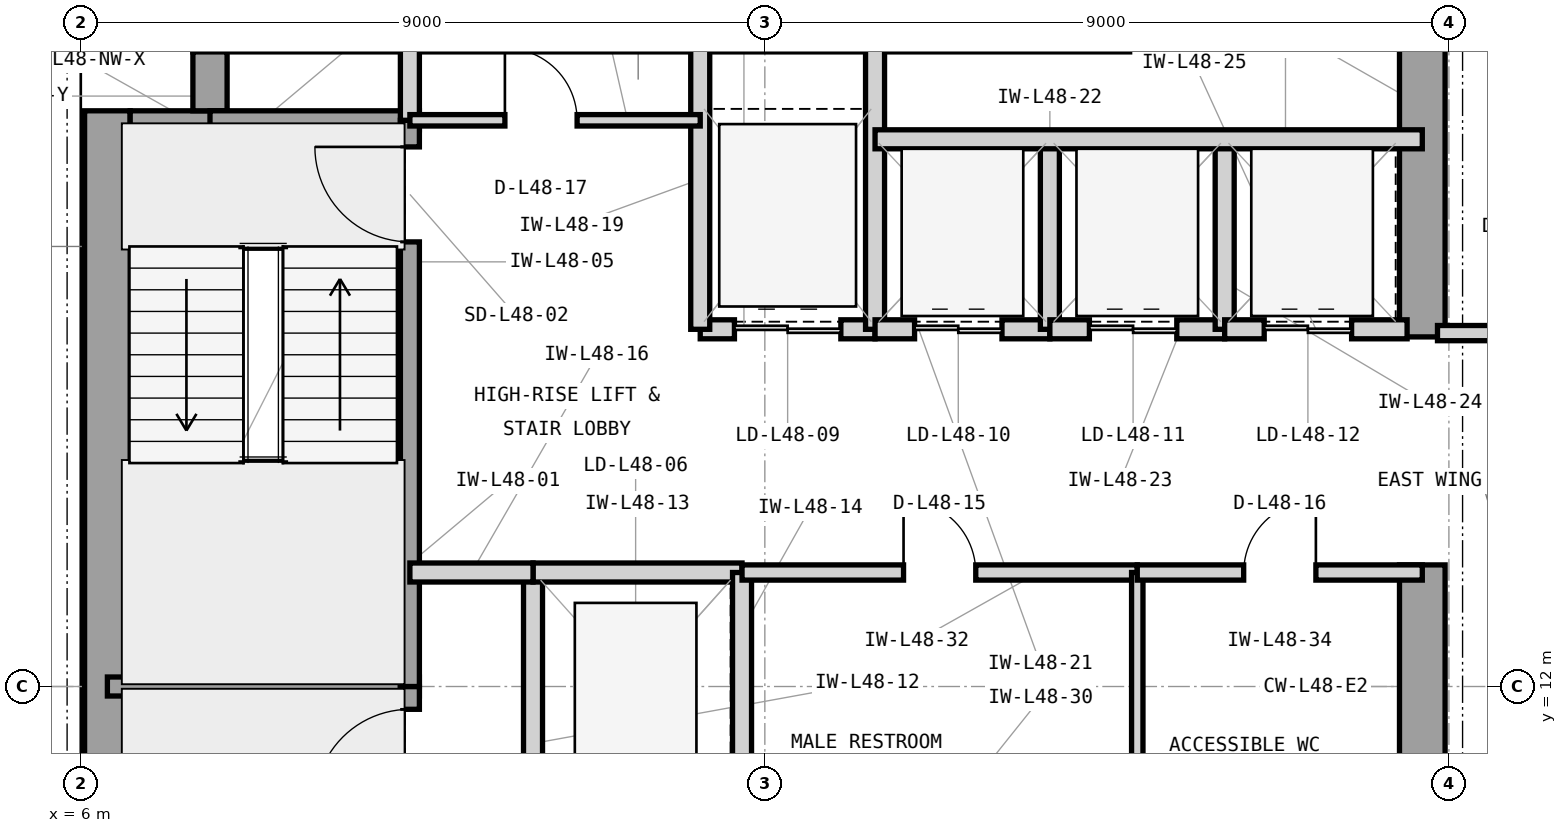
"""IFC4 building model, lengths in metres.
Left out: names, types, materials, properties, quantities, classifications, styles, units other than length and angle.
Written with IfcOpenShell. Run it as: python <this file> out.ifc"""

import sys

from ifc_helpers import new_model, si_unit, direction, frame, frame_2d, origin, place, context, subcontext, project, spatial, rectangle, extrude, element, fill, save


model = new_model("IFC4")
c1 = context("Model", 3, precision=1e-05, world=origin(), true_north=direction((0.0, 1.0)))
c2 = subcontext(c1, "Body", "Model", "MODEL_VIEW")
j1 = project(units=[si_unit("LENGTHUNIT", "METRE"), si_unit("PLANEANGLEUNIT", "RADIAN")], contexts=[c1])
p1 = place(None, origin())
s1 = spatial("IfcSite", under=j1, at=p1, CompositionType="ELEMENT")
p2 = place(p1, origin())
s2 = spatial("IfcBuilding", under=s1, at=p2, CompositionType="ELEMENT")
p3 = place(p2, frame((0.0, 0.0, 199.5)))
s3 = spatial("IfcBuildingStorey", under=s2, at=p3, CompositionType="ELEMENT", Elevation=199.5)
p4 = place(p3, frame((6.35, 4.425, 0.0), z_axis=(0.0, 0.0, 1.0), x_axis=(0.0, 1.0, 0.0)))
e1 = element("IfcWall", 1, at=p4, inside=s3, PredefinedType="SHEAR", context=c2, shape_type="SweptSolid", body=[
    extrude(rectangle(XDim=15.15, YDim=0.6, at=frame_2d((7.575, 0.0))), origin(), (0.0, 0.0, 1.0), 3.9),
])
p5 = place(p3, frame((7.475, 20.65, 0.0), z_axis=(0.0, 0.0, 1.0), x_axis=(1.0, 0.0, 0.0)))
e2 = element("IfcWall", 2, at=p5, inside=s3, PredefinedType="SHEAR", context=c2, shape_type="SweptSolid", body=[
    extrude(rectangle(XDim=12.325, YDim=0.6, at=frame_2d((6.163, 0.0))), origin(), (0.0, 0.0, 1.0), 3.9),
])
p6 = place(p3, frame((23.65, 10.4, 0.0), z_axis=(0.0, 0.0, 1.0), x_axis=(0.0, 1.0, 0.0)))
e3 = element("IfcWall", 3, at=p6, inside=s3, PredefinedType="SHEAR", context=c2, shape_type="SweptSolid", body=[
    extrude(rectangle(XDim=3.2, YDim=0.6, at=frame_2d((1.6, 0.0))), origin(), (0.0, 0.0, 1.0), 3.9),
])
p7 = place(p3, frame((23.65, 16.6, 0.0), z_axis=(0.0, 0.0, 1.0), x_axis=(0.0, 1.0, 0.0)))
e4 = element("IfcWall", 4, at=p7, inside=s3, PredefinedType="SHEAR", context=c2, shape_type="SweptSolid", body=[
    extrude(rectangle(XDim=4.05, YDim=0.6, at=frame_2d((2.025, 0.0))), origin(), (0.0, 0.0, 1.0), 3.9),
])
p8 = place(p3, frame((6.65, 19.35, 0.0), z_axis=(0.0, 0.0, 1.0), x_axis=(1.0, 0.0, 0.0)))
e5 = element("IfcWall", 5, at=p8, inside=s3, PredefinedType="SHEAR", context=c2, shape_type="SweptSolid", body=[
    extrude(rectangle(XDim=1.275, YDim=0.45, at=frame_2d((0.638, 0.0))), origin(), (0.0, 0.0, 1.0), 3.9),
])
p9 = place(p3, frame((7.7, 19.575, 0.0), z_axis=(0.0, 0.0, 1.0), x_axis=(0.0, 1.0, 0.0)))
e6 = element("IfcWall", 6, at=p9, inside=s3, PredefinedType="SHEAR", context=c2, shape_type="SweptSolid", body=[
    extrude(rectangle(XDim=0.775, YDim=0.45, at=frame_2d((0.388, 0.0))), origin(), (0.0, 0.0, 1.0), 3.9),
])
p10 = place(p3, frame((6.35, 12.0, 0.0), z_axis=(0.0, 0.0, 1.0), x_axis=(1.0, 0.0, 0.0)))
e7 = element("IfcWall", 7, at=p10, inside=s3, PredefinedType="SHEAR", context=c2, shape_type="SweptSolid", body=[
    extrude(rectangle(XDim=4.105, YDim=0.25, at=frame_2d((2.052, 0.0))), origin(), (0.0, 0.0, 1.0), 3.9),
])
p11 = place(p3, frame((7.7, 19.45, 0.0), z_axis=(0.0, 0.0, 1.0), x_axis=(1.0, 0.0, 0.0)))
e8 = element("IfcWall", 8, at=p11, inside=s3, PredefinedType="SHEAR", context=c2, shape_type="SweptSolid", body=[
    extrude(rectangle(XDim=2.755, YDim=0.25, at=frame_2d((1.377, 0.0))), origin(), (0.0, 0.0, 1.0), 3.9),
])
p12 = place(p3, frame((10.33, 4.55, 0.0), z_axis=(0.0, 0.0, 1.0), x_axis=(0.0, 1.0, 0.0)))
e9 = element("IfcWall", 9, at=p12, inside=s3, PredefinedType="SHEAR", context=c2, shape_type="SweptSolid", body=[
    extrude(rectangle(XDim=7.45, YDim=0.25, at=frame_2d((3.725, 0.0))), origin(), (0.0, 0.0, 1.0), 3.9),
])
p13 = place(p12, frame((5.9, 0.0, 0.0)))
e10 = element("IfcOpeningElement", 10, at=p13, cuts=e9, PredefinedType="OPENING", context=c2, shape_type="SweptSolid", body=[
    extrude(rectangle(XDim=1.25, YDim=2.2, at=frame_2d((0.625, 1.1))), frame((0.0, 0.135, 0.0), z_axis=(0.0, -1.0, 0.0), x_axis=(1.0, 0.0, 0.0)), (0.0, 0.0, 1.0), 0.27),
])
p14 = place(p3, frame((10.33, 12.0, 0.0), z_axis=(0.0, 0.0, 1.0), x_axis=(0.0, 1.0, 0.0)))
e11 = element("IfcWall", 11, at=p14, inside=s3, PredefinedType="SHEAR", context=c2, shape_type="SweptSolid", body=[
    extrude(rectangle(XDim=7.45, YDim=0.25, at=frame_2d((3.725, 0.0))), origin(), (0.0, 0.0, 1.0), 3.9),
])
p15 = place(p14, frame((5.85, 0.0, 0.0)))
e12 = element("IfcOpeningElement", 12, at=p15, cuts=e11, PredefinedType="OPENING", context=c2, shape_type="SweptSolid", body=[
    extrude(rectangle(XDim=1.25, YDim=2.2, at=frame_2d((0.625, 1.1))), frame((0.0, 0.135, 0.0), z_axis=(0.0, -1.0, 0.0), x_axis=(1.0, 0.0, 0.0)), (0.0, 0.0, 1.0), 0.27),
])
p16 = place(p3, frame((10.33, 19.45, 0.0), z_axis=(0.0, 0.0, 1.0), x_axis=(0.0, 1.0, 0.0)))
e13 = element("IfcWall", 13, at=p16, inside=s3, PredefinedType="PARTITIONING", context=c2, shape_type="SweptSolid", body=[
    extrude(rectangle(XDim=1.2, YDim=0.25, at=frame_2d((0.6, 0.0))), origin(), (0.0, 0.0, 1.0), 3.69),
])
p17 = place(p3, frame((11.95, 10.5, 0.0), z_axis=(0.0, 0.0, 1.0), x_axis=(0.0, 1.0, 0.0)))
e14 = element("IfcWall", 14, at=p17, inside=s3, PredefinedType="PARTITIONING", context=c2, shape_type="SweptSolid", body=[
    extrude(rectangle(XDim=3.0, YDim=0.25, at=frame_2d((1.5, 0.0))), origin(), (0.0, 0.0, 1.0), 3.69),
])
p18 = place(p3, frame((11.95, 13.5, 0.0), z_axis=(0.0, 0.0, 1.0), x_axis=(1.0, 0.0, 0.0)))
e15 = element("IfcWall", 15, at=p18, inside=s3, PredefinedType="PARTITIONING", context=c2, shape_type="SweptSolid", body=[
    extrude(rectangle(XDim=2.75, YDim=0.25, at=frame_2d((1.375, 0.0))), origin(), (0.0, 0.0, 1.0), 3.283),
])
p19 = place(p3, frame((14.7, 10.5, 0.0), z_axis=(0.0, 0.0, 1.0), x_axis=(0.0, 1.0, 0.0)))
e16 = element("IfcWall", 16, at=p19, inside=s3, PredefinedType="PARTITIONING", context=c2, shape_type="SweptSolid", body=[
    extrude(rectangle(XDim=3.0, YDim=0.25, at=frame_2d((1.5, 0.0))), origin(), (0.0, 0.0, 1.0), 3.69),
])
p20 = place(p3, frame((10.33, 13.5, 0.0), z_axis=(0.0, 0.0, 1.0), x_axis=(1.0, 0.0, 0.0)))
e17 = element("IfcWall", 17, at=p20, inside=s3, PredefinedType="PARTITIONING", context=c2, shape_type="SweptSolid", body=[
    extrude(rectangle(XDim=1.62, YDim=0.25, at=frame_2d((0.81, 0.0))), origin(), (0.0, 0.0, 1.0), 3.283),
])
p21 = place(p3, frame((14.15, 16.7, 0.0), z_axis=(0.0, 0.0, 1.0), x_axis=(1.0, 0.0, 0.0)))
e18 = element("IfcWall", 18, at=p21, inside=s3, PredefinedType="PARTITIONING", context=c2, shape_type="SweptSolid", body=[
    extrude(rectangle(XDim=2.3, YDim=0.25, at=frame_2d((1.15, 0.0))), origin(), (0.0, 0.0, 1.0), 3.283),
])
p22 = place(p21, frame((0.45, 0.0, 0.0)))
e19 = element("IfcOpeningElement", 19, at=p22, cuts=e18, PredefinedType="OPENING", context=c2, shape_type="SweptSolid", body=[
    extrude(rectangle(XDim=1.4, YDim=2.35, at=frame_2d((0.7, 1.175))), frame((0.0, 0.135, 0.0), z_axis=(0.0, -1.0, 0.0), x_axis=(1.0, 0.0, 0.0)), (0.0, 0.0, 1.0), 0.27),
])
for number, where, z_axis, x_axis in (
    (20, (14.15, 16.7, 0.0), (0.0, 0.0, 1.0), (0.0, 1.0, 0.0)),
    (21, (16.45, 16.7, 0.0), (0.0, 0.0, 1.0), (0.0, 1.0, 0.0)),
):
    element("IfcWall", number, at=place(p3, frame(where, z_axis=z_axis, x_axis=x_axis)), inside=s3, PredefinedType="PARTITIONING", context=c2, shape_type="SweptSolid", body=[
        extrude(rectangle(XDim=3.95, YDim=0.25, at=frame_2d((1.975, 0.0))), origin(), (0.0, 0.0, 1.0), 3.69),
    ])
p23 = place(p3, frame((16.45, 16.7, 0.0), z_axis=(0.0, 0.0, 1.0), x_axis=(1.0, 0.0, 0.0)))
e22 = element("IfcWall", 22, at=p23, inside=s3, PredefinedType="PARTITIONING", context=c2, shape_type="SweptSolid", body=[
    extrude(rectangle(XDim=2.3, YDim=0.25, at=frame_2d((1.15, 0.0))), origin(), (0.0, 0.0, 1.0), 3.283),
])
p24 = place(p23, frame((0.52, 0.0, 0.0)))
e23 = element("IfcOpeningElement", 23, at=p24, cuts=e22, PredefinedType="OPENING", context=c2, shape_type="SweptSolid", body=[
    extrude(rectangle(XDim=1.15, YDim=2.25, at=frame_2d((0.575, 1.125))), frame((0.0, 0.135, 0.0), z_axis=(0.0, -1.0, 0.0), x_axis=(1.0, 0.0, 0.0)), (0.0, 0.0, 1.0), 0.27),
])
p25 = place(p3, frame((18.75, 16.7, 0.0), z_axis=(0.0, 0.0, 1.0), x_axis=(0.0, 1.0, 0.0)))
e24 = element("IfcWall", 24, at=p25, inside=s3, PredefinedType="PARTITIONING", context=c2, shape_type="SweptSolid", body=[
    extrude(rectangle(XDim=2.5, YDim=0.25, at=frame_2d((1.25, 0.0))), origin(), (0.0, 0.0, 1.0), 3.69),
])
p26 = place(p3, frame((18.75, 16.7, 0.0), z_axis=(0.0, 0.0, 1.0), x_axis=(1.0, 0.0, 0.0)))
e25 = element("IfcWall", 25, at=p26, inside=s3, PredefinedType="PARTITIONING", context=c2, shape_type="SweptSolid", body=[
    extrude(rectangle(XDim=2.3, YDim=0.25, at=frame_2d((1.15, 0.0))), origin(), (0.0, 0.0, 1.0), 3.283),
])
p27 = place(p26, frame((0.52, 0.0, 0.0)))
e26 = element("IfcOpeningElement", 26, at=p27, cuts=e25, PredefinedType="OPENING", context=c2, shape_type="SweptSolid", body=[
    extrude(rectangle(XDim=1.15, YDim=2.25, at=frame_2d((0.575, 1.125))), frame((0.0, 0.135, 0.0), z_axis=(0.0, -1.0, 0.0), x_axis=(1.0, 0.0, 0.0)), (0.0, 0.0, 1.0), 0.27),
])
p28 = place(p3, frame((21.05, 16.7, 0.0), z_axis=(0.0, 0.0, 1.0), x_axis=(0.0, 1.0, 0.0)))
e27 = element("IfcWall", 27, at=p28, inside=s3, PredefinedType="PARTITIONING", context=c2, shape_type="SweptSolid", body=[
    extrude(rectangle(XDim=2.5, YDim=0.25, at=frame_2d((1.25, 0.0))), origin(), (0.0, 0.0, 1.0), 3.69),
])
p29 = place(p3, frame((21.05, 16.7, 0.0), z_axis=(0.0, 0.0, 1.0), x_axis=(1.0, 0.0, 0.0)))
e28 = element("IfcWall", 28, at=p29, inside=s3, PredefinedType="PARTITIONING", context=c2, shape_type="SweptSolid", body=[
    extrude(rectangle(XDim=2.4, YDim=0.25, at=frame_2d((1.2, 0.0))), origin(), (0.0, 0.0, 1.0), 3.283),
])
p30 = place(p29, frame((0.52, 0.0, 0.0)))
e29 = element("IfcOpeningElement", 29, at=p30, cuts=e28, PredefinedType="OPENING", context=c2, shape_type="SweptSolid", body=[
    extrude(rectangle(XDim=1.15, YDim=2.25, at=frame_2d((0.575, 1.125))), frame((0.0, 0.135, 0.0), z_axis=(0.0, -1.0, 0.0), x_axis=(1.0, 0.0, 0.0)), (0.0, 0.0, 1.0), 0.27),
])
p31 = place(p3, frame((16.45, 19.2, 0.0), z_axis=(0.0, 0.0, 1.0), x_axis=(1.0, 0.0, 0.0)))
e30 = element("IfcWall", 30, at=p31, inside=s3, PredefinedType="PARTITIONING", context=c2, shape_type="SweptSolid", body=[
    extrude(rectangle(XDim=7.2, YDim=0.25, at=frame_2d((3.6, 0.0))), origin(), (0.0, 0.0, 1.0), 3.69),
])
p32 = place(p3, frame((14.7, 13.5, 0.0), z_axis=(0.0, 0.0, 1.0), x_axis=(1.0, 0.0, 0.0)))
e31 = element("IfcWall", 31, at=p32, inside=s3, PredefinedType="PARTITIONING", context=c2, shape_type="SweptSolid", body=[
    extrude(rectangle(XDim=5.2, YDim=0.2, at=frame_2d((2.6, 0.0))), origin(), (0.0, 0.0, 1.0), 3.283),
])
p33 = place(p32, frame((2.125, 0.0, 0.0)))
e32 = element("IfcOpeningElement", 32, at=p33, cuts=e31, PredefinedType="OPENING", context=c2, shape_type="SweptSolid", body=[
    extrude(rectangle(XDim=0.95, YDim=2.1, at=frame_2d((0.475, 1.05))), frame((0.0, 0.11, 0.0), z_axis=(0.0, -1.0, 0.0), x_axis=(1.0, 0.0, 0.0)), (0.0, 0.0, 1.0), 0.22),
])
p34 = place(p3, frame((19.9, 9.85, 0.0), z_axis=(0.0, 0.0, 1.0), x_axis=(0.0, 1.0, 0.0)))
e33 = element("IfcWall", 33, at=p34, inside=s3, PredefinedType="PARTITIONING", context=c2, shape_type="SweptSolid", body=[
    extrude(rectangle(XDim=3.65, YDim=0.15, at=frame_2d((1.825, 0.0))), origin(), (0.0, 0.0, 1.0), 3.69),
])
p35 = place(p3, frame((19.9, 13.5, 0.0), z_axis=(0.0, 0.0, 1.0), x_axis=(1.0, 0.0, 0.0)))
e34 = element("IfcWall", 34, at=p35, inside=s3, PredefinedType="PARTITIONING", context=c2, shape_type="SweptSolid", body=[
    extrude(rectangle(XDim=3.75, YDim=0.2, at=frame_2d((1.875, 0.0))), origin(), (0.0, 0.0, 1.0), 3.283),
])
p36 = place(p35, frame((1.4, 0.0, 0.0)))
e35 = element("IfcOpeningElement", 35, at=p36, cuts=e34, PredefinedType="OPENING", context=c2, shape_type="SweptSolid", body=[
    extrude(rectangle(XDim=0.95, YDim=2.1, at=frame_2d((0.475, 1.05))), frame((0.0, 0.11, 0.0), z_axis=(0.0, -1.0, 0.0), x_axis=(1.0, 0.0, 0.0)), (0.0, 0.0, 1.0), 0.22),
])
p37 = place(p3, frame((10.33, 19.45, 0.0), z_axis=(0.0, 0.0, 1.0), x_axis=(1.0, 0.0, 0.0)))
e36 = element("IfcWall", 36, at=p37, inside=s3, PredefinedType="PARTITIONING", context=c2, shape_type="SweptSolid", body=[
    extrude(rectangle(XDim=3.82, YDim=0.15, at=frame_2d((1.91, 0.0))), origin(), (0.0, 0.0, 1.0), 3.69),
])
p38 = place(p37, frame((1.25, 0.0, 0.0)))
e37 = element("IfcOpeningElement", 37, at=p38, cuts=e36, PredefinedType="OPENING", context=c2, shape_type="SweptSolid", body=[
    extrude(rectangle(XDim=0.95, YDim=2.1, at=frame_2d((0.475, 1.05))), frame((0.0, 0.085, 0.0), z_axis=(0.0, -1.0, 0.0), x_axis=(1.0, 0.0, 0.0)), (0.0, 0.0, 1.0), 0.17),
])
p39 = place(p3, frame((23.85, 16.65, 0.0), z_axis=(0.0, 0.0, 1.0), x_axis=(1.0, 0.0, 0.0)))
e38 = element("IfcWall", 38, at=p39, inside=s3, PredefinedType="PARTITIONING", context=c2, shape_type="SweptSolid", body=[
    extrude(rectangle(XDim=2.85, YDim=0.2, at=frame_2d((1.425, 0.0))), origin(), (0.0, 0.0, 1.0), 3.69),
])
p40 = place(p39, frame((0.7, 0.0, 0.0)))
e39 = element("IfcOpeningElement", 39, at=p40, cuts=e38, PredefinedType="OPENING", context=c2, shape_type="SweptSolid", body=[
    extrude(rectangle(XDim=1.0, YDim=2.15, at=frame_2d((0.5, 1.075))), frame((0.0, 0.11, 0.0), z_axis=(0.0, -1.0, 0.0), x_axis=(1.0, 0.0, 0.0)), (0.0, 0.0, 1.0), 0.22),
])
p41 = place(p13, origin())
e40 = element("IfcDoor", 40, at=p41, inside=s3, OperationType="SINGLE_SWING_LEFT", PredefinedType="DOOR", context=c2, shape_type="SweptSolid", body=[
    extrude(rectangle(XDim=1.25, YDim=2.2, at=frame_2d((0.625, 1.1))), frame((0.0, 0.025, 0.0), z_axis=(0.0, -1.0, 0.0), x_axis=(1.0, 0.0, 0.0)), (0.0, 0.0, 1.0), 0.05),
])
fill(e10, e40)
p42 = place(p15, origin())
e41 = element("IfcDoor", 41, at=p42, inside=s3, OperationType="SINGLE_SWING_RIGHT", PredefinedType="DOOR", context=c2, shape_type="SweptSolid", body=[
    extrude(rectangle(XDim=1.25, YDim=2.2, at=frame_2d((0.625, 1.1))), frame((0.0, 0.025, 0.0), z_axis=(0.0, -1.0, 0.0), x_axis=(1.0, 0.0, 0.0)), (0.0, 0.0, 1.0), 0.05),
])
fill(e12, e41)
p43 = place(p22, origin())
e42 = element("IfcDoor", 42, at=p43, inside=s3, OperationType="DOUBLE_DOOR_SLIDING", PredefinedType="DOOR", context=c2, shape_type="SweptSolid", body=[
    extrude(rectangle(XDim=1.4, YDim=2.35, at=frame_2d((0.7, 1.175))), frame((0.0, 0.025, 0.0), z_axis=(0.0, -1.0, 0.0), x_axis=(1.0, 0.0, 0.0)), (0.0, 0.0, 1.0), 0.05),
])
fill(e19, e42)
p44 = place(p24, origin())
e43 = element("IfcDoor", 43, at=p44, inside=s3, OperationType="DOUBLE_DOOR_SLIDING", PredefinedType="DOOR", context=c2, shape_type="SweptSolid", body=[
    extrude(rectangle(XDim=1.15, YDim=2.25, at=frame_2d((0.575, 1.125))), frame((0.0, 0.025, 0.0), z_axis=(0.0, -1.0, 0.0), x_axis=(1.0, 0.0, 0.0)), (0.0, 0.0, 1.0), 0.05),
])
fill(e23, e43)
p45 = place(p27, origin())
e44 = element("IfcDoor", 44, at=p45, inside=s3, OperationType="DOUBLE_DOOR_SLIDING", PredefinedType="DOOR", context=c2, shape_type="SweptSolid", body=[
    extrude(rectangle(XDim=1.15, YDim=2.25, at=frame_2d((0.575, 1.125))), frame((0.0, 0.025, 0.0), z_axis=(0.0, -1.0, 0.0), x_axis=(1.0, 0.0, 0.0)), (0.0, 0.0, 1.0), 0.05),
])
fill(e26, e44)
p46 = place(p30, origin())
e45 = element("IfcDoor", 45, at=p46, inside=s3, OperationType="DOUBLE_DOOR_SLIDING", PredefinedType="DOOR", context=c2, shape_type="SweptSolid", body=[
    extrude(rectangle(XDim=1.15, YDim=2.25, at=frame_2d((0.575, 1.125))), frame((0.0, 0.025, 0.0), z_axis=(0.0, -1.0, 0.0), x_axis=(1.0, 0.0, 0.0)), (0.0, 0.0, 1.0), 0.05),
])
fill(e29, e45)
p47 = place(p33, origin())
e46 = element("IfcDoor", 46, at=p47, inside=s3, OperationType="SINGLE_SWING_LEFT", PredefinedType="DOOR", context=c2, shape_type="SweptSolid", body=[
    extrude(rectangle(XDim=0.95, YDim=2.1, at=frame_2d((0.475, 1.05))), frame((0.0, 0.025, 0.0), z_axis=(0.0, -1.0, 0.0), x_axis=(1.0, 0.0, 0.0)), (0.0, 0.0, 1.0), 0.05),
])
fill(e32, e46)
p48 = place(p36, origin())
e47 = element("IfcDoor", 47, at=p48, inside=s3, OperationType="SINGLE_SWING_RIGHT", PredefinedType="DOOR", context=c2, shape_type="SweptSolid", body=[
    extrude(rectangle(XDim=0.95, YDim=2.1, at=frame_2d((0.475, 1.05))), frame((0.0, 0.025, 0.0), z_axis=(0.0, -1.0, 0.0), x_axis=(1.0, 0.0, 0.0)), (0.0, 0.0, 1.0), 0.05),
])
fill(e35, e47)
p49 = place(p38, origin())
e48 = element("IfcDoor", 48, at=p49, inside=s3, OperationType="SINGLE_SWING_LEFT", PredefinedType="DOOR", context=c2, shape_type="SweptSolid", body=[
    extrude(rectangle(XDim=0.95, YDim=2.1, at=frame_2d((0.475, 1.05))), frame((0.0, 0.025, 0.0), z_axis=(0.0, -1.0, 0.0), x_axis=(1.0, 0.0, 0.0)), (0.0, 0.0, 1.0), 0.05),
])
fill(e37, e48)
save(model, sys.argv[1])
